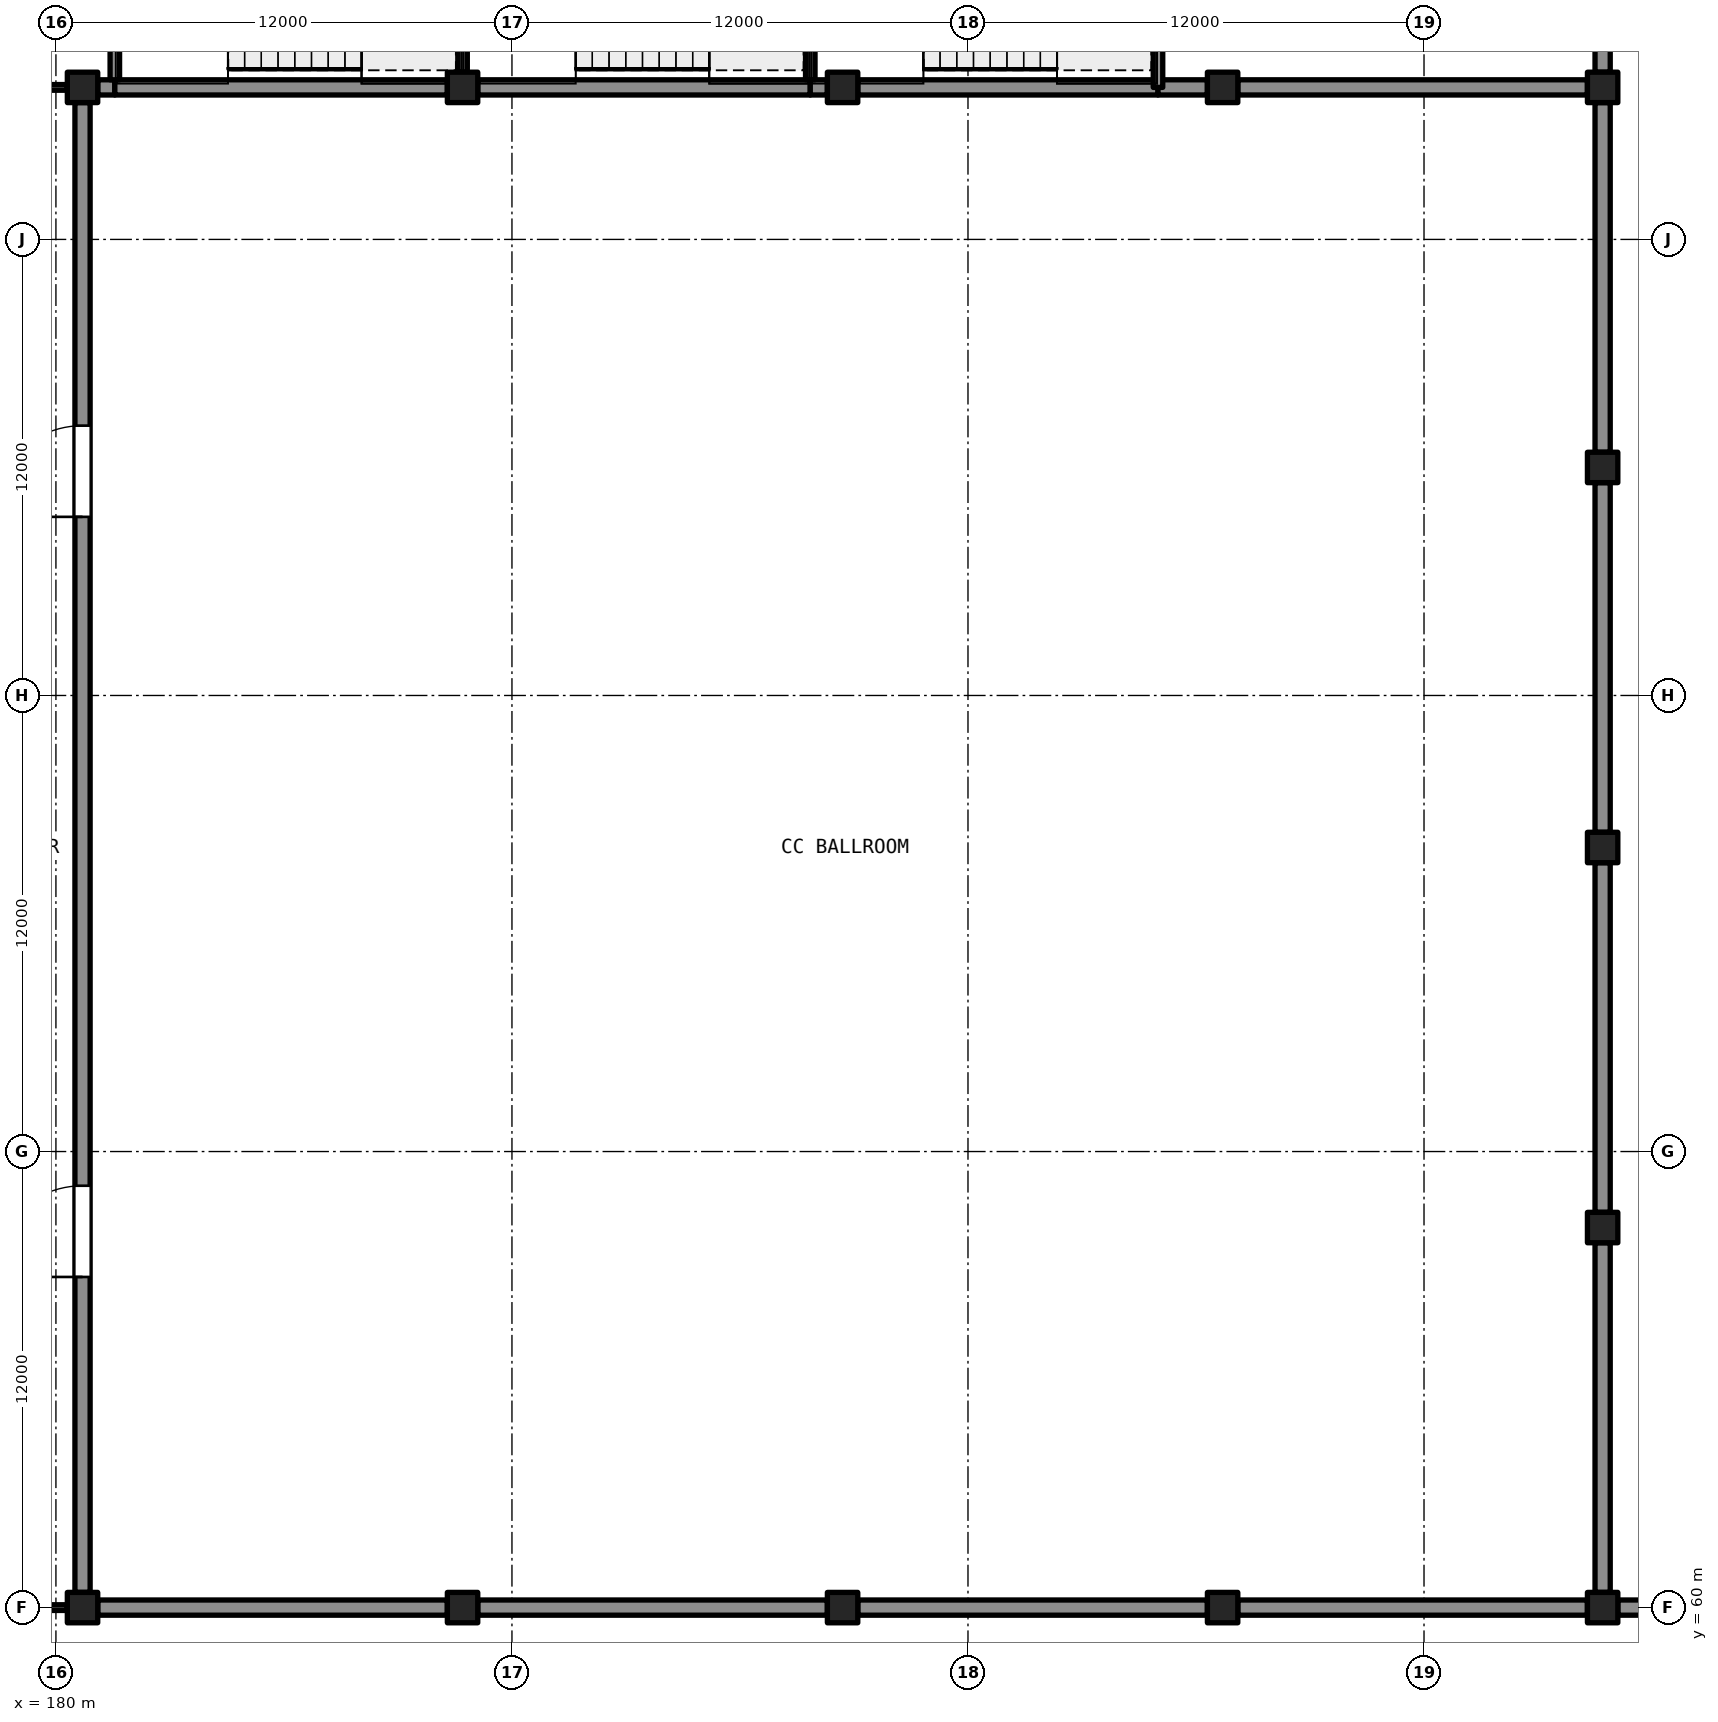
"""IFC4 building model, lengths in metres.
Left out: names, types, materials, properties, quantities, classifications, styles, units other than length and angle.
Written with IfcOpenShell. Run it as: python <this file> out.ifc"""

import sys

from ifc_helpers import new_model, si_unit, direction, frame, frame_2d, origin, origin_2d, place, context, subcontext, project, spatial, rectangle, extrude, element, fill, save


model = new_model("IFC4")
c1 = context("Model", 3, precision=1e-05, world=origin(), true_north=direction((0.0, 1.0)))
c2 = subcontext(c1, "Body", "Model", "MODEL_VIEW")
j1 = project(units=[si_unit("LENGTHUNIT", "METRE"), si_unit("PLANEANGLEUNIT", "RADIAN")], contexts=[c1])
p1 = place(None, origin())
s1 = spatial("IfcSite", under=j1, at=p1, CompositionType="ELEMENT")
p2 = place(p1, origin())
s2 = spatial("IfcBuilding", under=s1, at=p2, CompositionType="ELEMENT")
p3 = place(p2, frame((0.0, 0.0, 15.0)))
s3 = spatial("IfcBuildingStorey", under=s2, at=p3, CompositionType="ELEMENT", Elevation=15.0)
for number, where, z_axis, x_axis in (
    (1, (180.7, 60.0, 0.0), (0.0, 0.0, 1.0), (1.0, 0.0, 0.0)),
    (2, (180.7, 100.0, 0.0), (0.0, 0.0, 1.0), (1.0, 0.0, 0.0)),
    (3, (190.7, 60.0, 0.0), (0.0, 0.0, 1.0), (1.0, 0.0, 0.0)),
    (4, (190.7, 100.0, 0.0), (0.0, 0.0, 1.0), (1.0, 0.0, 0.0)),
    (5, (200.7, 60.0, 0.0), (0.0, 0.0, 1.0), (1.0, 0.0, 0.0)),
    (6, (200.7, 100.0, 0.0), (0.0, 0.0, 1.0), (1.0, 0.0, 0.0)),
    (7, (210.7, 60.0, 0.0), (0.0, 0.0, 1.0), (1.0, 0.0, 0.0)),
    (8, (210.7, 100.0, 0.0), (0.0, 0.0, 1.0), (1.0, 0.0, 0.0)),
    (9, (220.7, 60.0, 0.0), (0.0, 0.0, 1.0), (1.0, 0.0, 0.0)),
    (10, (220.7, 70.0, 0.0), (0.0, 0.0, 1.0), (1.0, 0.0, 0.0)),
    (11, (220.7, 80.0, 0.0), (0.0, 0.0, 1.0), (1.0, 0.0, 0.0)),
    (12, (220.7, 90.0, 0.0), (0.0, 0.0, 1.0), (1.0, 0.0, 0.0)),
    (13, (220.7, 100.0, 0.0), (0.0, 0.0, 1.0), (1.0, 0.0, 0.0)),
):
    element("IfcColumn", number, at=place(p3, frame(where, z_axis=z_axis, x_axis=x_axis)), inside=s3, PredefinedType="COLUMN", context=c2, shape_type="SweptSolid", body=[
        extrude(rectangle(XDim=0.8, YDim=0.8, at=origin_2d()), origin(), (0.0, 0.0, 1.0), 5.4),
    ])
p4 = place(p3, frame((180.7, 60.4, 0.0), z_axis=(0.0, 0.0, 1.0), x_axis=(0.0, 1.0, 0.0)))
e14 = element("IfcWall", 14, at=p4, inside=s3, PredefinedType="SHEAR", context=c2, shape_type="SweptSolid", body=[
    extrude(rectangle(XDim=39.2, YDim=0.4, at=frame_2d((19.6, 0.0))), origin(), (0.0, 0.0, 1.0), 5.4),
])
p5 = place(p4, frame((8.3, 0.0, 0.0)))
e15 = element("IfcOpeningElement", 15, at=p5, cuts=e14, PredefinedType="OPENING", context=c2, shape_type="SweptSolid", body=[
    extrude(rectangle(XDim=2.4, YDim=2.4, at=frame_2d((1.2, 1.2))), frame((0.0, 0.21, 0.0), z_axis=(0.0, -1.0, 0.0), x_axis=(1.0, 0.0, 0.0)), (0.0, 0.0, 1.0), 0.421),
])
p6 = place(p4, frame((28.3, 0.0, 0.0)))
e16 = element("IfcOpeningElement", 16, at=p6, cuts=e14, PredefinedType="OPENING", context=c2, shape_type="SweptSolid", body=[
    extrude(rectangle(XDim=2.4, YDim=2.4, at=frame_2d((1.2, 1.2))), frame((0.0, 0.21, 0.0), z_axis=(0.0, -1.0, 0.0), x_axis=(1.0, 0.0, 0.0)), (0.0, 0.0, 1.0), 0.421),
])
for number, where, z_axis, x_axis in (
    (17, (181.1, 60.0, 0.0), (0.0, 0.0, 1.0), (1.0, 0.0, 0.0)),
    (18, (191.1, 60.0, 0.0), (0.0, 0.0, 1.0), (1.0, 0.0, 0.0)),
    (19, (201.1, 60.0, 0.0), (0.0, 0.0, 1.0), (1.0, 0.0, 0.0)),
    (20, (211.1, 60.0, 0.0), (0.0, 0.0, 1.0), (1.0, 0.0, 0.0)),
):
    element("IfcWall", number, at=place(p3, frame(where, z_axis=z_axis, x_axis=x_axis)), inside=s3, PredefinedType="SHEAR", context=c2, shape_type="SweptSolid", body=[
        extrude(rectangle(XDim=9.2, YDim=0.4, at=frame_2d((4.6, 0.0))), origin(), (0.0, 0.0, 1.0), 5.4),
    ])
p7 = place(p3, frame((181.1, 100.0, 0.0), z_axis=(0.0, 0.0, 1.0), x_axis=(1.0, 0.0, 0.0)))
e21 = element("IfcWall", 21, at=p7, inside=s3, PredefinedType="SHEAR", context=c2, shape_type="SweptSolid", body=[
    extrude(rectangle(XDim=0.45, YDim=0.4, at=frame_2d((0.225, 0.0))), origin(), (0.0, 0.0, 1.0), 5.4),
])
for number, where, z_axis, x_axis in (
    (22, (181.55, 100.0, 0.0), (0.0, 0.0, 1.0), (1.0, 0.0, 0.0)),
    (23, (191.1, 100.0, 0.0), (0.0, 0.0, 1.0), (1.0, 0.0, 0.0)),
):
    element("IfcWall", number, at=place(p3, frame(where, z_axis=z_axis, x_axis=x_axis)), inside=s3, PredefinedType="SHEAR", context=c2, shape_type="SweptSolid", body=[
        extrude(rectangle(XDim=8.75, YDim=0.4, at=frame_2d((4.375, 0.0))), origin(), (0.0, 0.0, 1.0), 5.4),
    ])
p8 = place(p3, frame((199.85, 100.0, 0.0), z_axis=(0.0, 0.0, 1.0), x_axis=(1.0, 0.0, 0.0)))
e24 = element("IfcWall", 24, at=p8, inside=s3, PredefinedType="SHEAR", context=c2, shape_type="SweptSolid", body=[
    extrude(rectangle(XDim=0.45, YDim=0.4, at=frame_2d((0.225, 0.0))), origin(), (0.0, 0.0, 1.0), 5.4),
])
p9 = place(p3, frame((201.1, 100.0, 0.0), z_axis=(0.0, 0.0, 1.0), x_axis=(1.0, 0.0, 0.0)))
e25 = element("IfcWall", 25, at=p9, inside=s3, PredefinedType="SHEAR", context=c2, shape_type="SweptSolid", body=[
    extrude(rectangle(XDim=7.9, YDim=0.4, at=frame_2d((3.95, 0.0))), origin(), (0.0, 0.0, 1.0), 5.4),
])
p10 = place(p3, frame((209.0, 100.0, 0.0), z_axis=(0.0, 0.0, 1.0), x_axis=(1.0, 0.0, 0.0)))
e26 = element("IfcWall", 26, at=p10, inside=s3, PredefinedType="SHEAR", context=c2, shape_type="SweptSolid", body=[
    extrude(rectangle(XDim=1.3, YDim=0.4, at=frame_2d((0.65, 0.0))), origin(), (0.0, 0.0, 1.0), 5.4),
])
p11 = place(p3, frame((211.1, 100.0, 0.0), z_axis=(0.0, 0.0, 1.0), x_axis=(1.0, 0.0, 0.0)))
e27 = element("IfcWall", 27, at=p11, inside=s3, PredefinedType="SHEAR", context=c2, shape_type="SweptSolid", body=[
    extrude(rectangle(XDim=9.2, YDim=0.4, at=frame_2d((4.6, 0.0))), origin(), (0.0, 0.0, 1.0), 5.4),
])
for number, where, z_axis, x_axis in (
    (28, (220.7, 60.4, 0.0), (0.0, 0.0, 1.0), (0.0, 1.0, 0.0)),
    (29, (220.7, 70.4, 0.0), (0.0, 0.0, 1.0), (0.0, 1.0, 0.0)),
    (30, (220.7, 80.4, 0.0), (0.0, 0.0, 1.0), (0.0, 1.0, 0.0)),
    (31, (220.7, 90.4, 0.0), (0.0, 0.0, 1.0), (0.0, 1.0, 0.0)),
):
    element("IfcWall", number, at=place(p3, frame(where, z_axis=z_axis, x_axis=x_axis)), inside=s3, PredefinedType="SHEAR", context=c2, shape_type="SweptSolid", body=[
        extrude(rectangle(XDim=9.2, YDim=0.4, at=frame_2d((4.6, 0.0))), origin(), (0.0, 0.0, 1.0), 5.4),
    ])
p12 = place(p3, frame((230.7, 60.0, 0.0), z_axis=(0.0, 0.0, 1.0), x_axis=(-1.0, 0.0, 0.0)))
e32 = element("IfcWall", 32, at=p12, inside=s3, PredefinedType="SHEAR", context=c2, shape_type="SweptSolid", body=[
    extrude(rectangle(XDim=9.6, YDim=0.4, at=frame_2d((4.8, 0.0))), origin(), (0.0, 0.0, 1.0), 5.4),
])
p13 = place(p12, frame((3.0, 0.0, 0.0)))
e33 = element("IfcOpeningElement", 33, at=p13, cuts=e32, PredefinedType="OPENING", context=c2, shape_type="SweptSolid", body=[
    extrude(rectangle(XDim=2.4, YDim=2.4, at=frame_2d((1.2, 1.2))), frame((0.0, 0.21, 0.0), z_axis=(0.0, -1.0, 0.0), x_axis=(1.0, 0.0, 0.0)), (0.0, 0.0, 1.0), 0.421),
])
p14 = place(p3, frame((220.7, 100.4, 0.0), z_axis=(0.0, 0.0, 1.0), x_axis=(0.0, 1.0, 0.0)))
e34 = element("IfcWall", 34, at=p14, inside=s3, PredefinedType="SHEAR", context=c2, shape_type="SweptSolid", body=[
    extrude(rectangle(XDim=9.2, YDim=0.4, at=frame_2d((4.6, 0.0))), origin(), (0.0, 0.0, 1.0), 5.4),
])
p15 = place(p3, frame((180.3, 60.0, 0.0), z_axis=(0.0, 0.0, 1.0), x_axis=(-1.0, 0.0, 0.0)))
e35 = element("IfcWall", 35, at=p15, inside=s3, PredefinedType="PARTITIONING", context=c2, shape_type="SweptSolid", body=[
    extrude(rectangle(XDim=9.2, YDim=0.15, at=frame_2d((4.6, 0.0))), origin(), (0.0, 0.0, 1.0), 4.99),
])
p16 = place(p15, frame((3.6, 0.0, 0.0)))
e36 = element("IfcOpeningElement", 36, at=p16, cuts=e35, PredefinedType="OPENING", context=c2, shape_type="SweptSolid", body=[
    extrude(rectangle(XDim=1.8, YDim=2.1, at=frame_2d((0.9, 1.05))), frame((0.0, 0.085, 0.0), z_axis=(0.0, -1.0, 0.0), x_axis=(1.0, 0.0, 0.0)), (0.0, 0.0, 1.0), 0.171),
])
p17 = place(p3, frame((170.7, 100.0, 0.0), z_axis=(0.0, 0.0, 1.0), x_axis=(1.0, 0.0, 0.0)))
e37 = element("IfcWall", 37, at=p17, inside=s3, PredefinedType="PARTITIONING", context=c2, shape_type="SweptSolid", body=[
    extrude(rectangle(XDim=9.6, YDim=0.15, at=frame_2d((4.8, 0.0))), origin(), (0.0, 0.0, 1.0), 4.99),
])
p18 = place(p3, frame((181.55, 100.2, 0.0), z_axis=(0.0, 0.0, 1.0), x_axis=(0.0, 1.0, 0.0)))
e38 = element("IfcWall", 38, at=p18, inside=s3, PredefinedType="SHEAR", context=c2, shape_type="SweptSolid", body=[
    extrude(rectangle(XDim=4.525, YDim=0.25, at=frame_2d((2.263, 0.0))), origin(), (0.0, 0.0, 1.0), 4.99),
])
p19 = place(p3, frame((190.7, 100.4, 0.0), z_axis=(0.0, 0.0, 1.0), x_axis=(0.0, 1.0, 0.0)))
e39 = element("IfcWall", 39, at=p19, inside=s3, PredefinedType="SHEAR", context=c2, shape_type="SweptSolid", body=[
    extrude(rectangle(XDim=4.325, YDim=0.25, at=frame_2d((2.163, 0.0))), origin(), (0.0, 0.0, 1.0), 4.99),
])
p20 = place(p3, frame((199.85, 100.2, 0.0), z_axis=(0.0, 0.0, 1.0), x_axis=(0.0, 1.0, 0.0)))
e40 = element("IfcWall", 40, at=p20, inside=s3, PredefinedType="SHEAR", context=c2, shape_type="SweptSolid", body=[
    extrude(rectangle(XDim=4.525, YDim=0.25, at=frame_2d((2.263, 0.0))), origin(), (0.0, 0.0, 1.0), 4.99),
])
p21 = place(p3, frame((209.0, 100.0, 0.0), z_axis=(0.0, 0.0, 1.0), x_axis=(0.0, 1.0, 0.0)))
e41 = element("IfcWall", 41, at=p21, inside=s3, PredefinedType="SHEAR", context=c2, shape_type="SweptSolid", body=[
    extrude(rectangle(XDim=4.725, YDim=0.25, at=frame_2d((2.363, 0.0))), origin(), (0.0, 0.0, 1.0), 4.99),
])
p22 = place(p5, origin())
e42 = element("IfcDoor", 42, at=p22, inside=s3, OperationType="DOUBLE_DOOR_SINGLE_SWING", PredefinedType="DOOR", context=c2, shape_type="SweptSolid", body=[
    extrude(rectangle(XDim=2.4, YDim=2.4, at=frame_2d((1.2, 1.2))), frame((0.0, 0.025, 0.0), z_axis=(0.0, -1.0, 0.0), x_axis=(1.0, 0.0, 0.0)), (0.0, 0.0, 1.0), 0.05),
])
fill(e15, e42)
p23 = place(p6, origin())
e43 = element("IfcDoor", 43, at=p23, inside=s3, OperationType="DOUBLE_DOOR_SINGLE_SWING", PredefinedType="DOOR", context=c2, shape_type="SweptSolid", body=[
    extrude(rectangle(XDim=2.4, YDim=2.4, at=frame_2d((1.2, 1.2))), frame((0.0, 0.025, 0.0), z_axis=(0.0, -1.0, 0.0), x_axis=(1.0, 0.0, 0.0)), (0.0, 0.0, 1.0), 0.05),
])
fill(e16, e43)
save(model, sys.argv[1])
